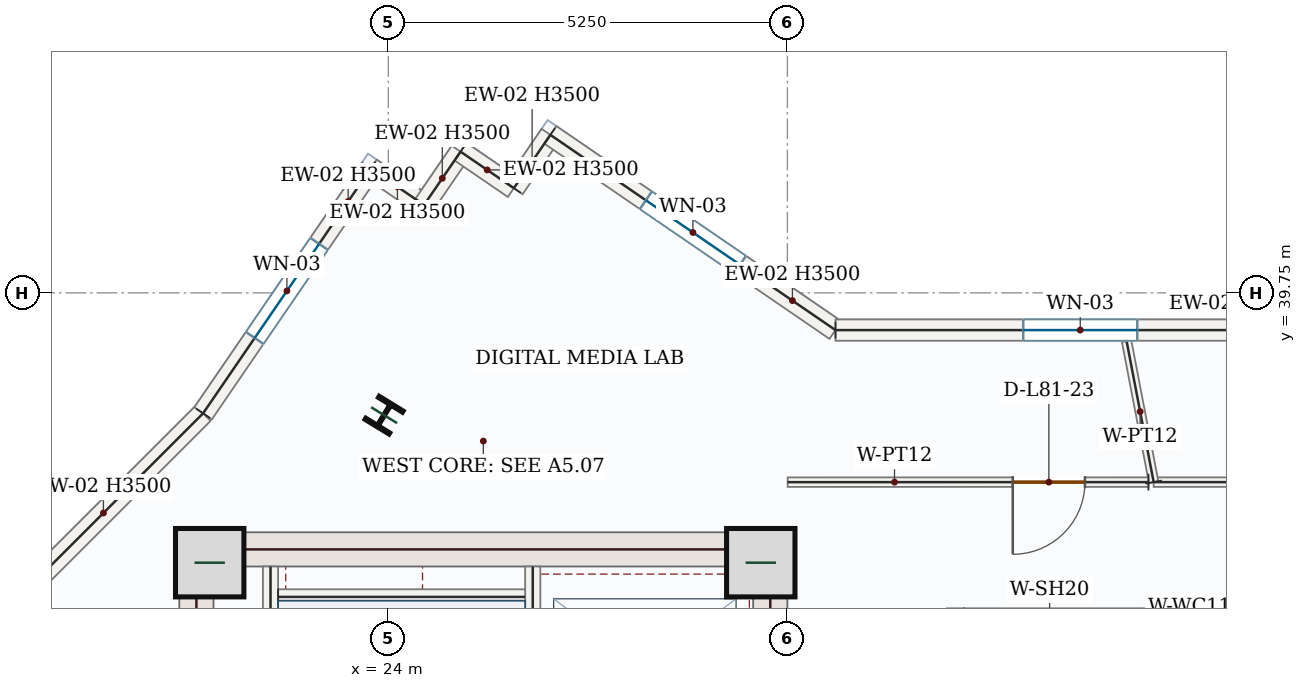
"""IFC4 building model, lengths in metres.
Left out: names, types, materials, properties, quantities, classifications, styles, units other than length and angle.
Written with IfcOpenShell. Run it as: python <this file> out.ifc"""

import sys

from ifc_helpers import new_model, si_unit, direction, frame, frame_2d, origin, origin_2d, place, context, subcontext, project, spatial, rectangle, i_section, extrude, source, transform, mapped, element, fill, save


model = new_model("IFC4")
c1 = context("Model", 3, precision=1e-05, world=origin(), true_north=direction((0.0, 1.0)))
c2 = subcontext(c1, "Body", "Model", "MODEL_VIEW")
j1 = project(units=[si_unit("LENGTHUNIT", "METRE"), si_unit("PLANEANGLEUNIT", "RADIAN")], contexts=[c1])
p1 = place(None, origin())
s1 = spatial("IfcSite", under=j1, at=p1, CompositionType="ELEMENT")
p2 = place(p1, origin())
s2 = spatial("IfcBuilding", under=s1, at=p2, CompositionType="ELEMENT")
p3 = place(p2, frame((0.0, 0.0, 334.8)))
s3 = spatial("IfcBuildingStorey", under=s2, at=p3, CompositionType="ELEMENT", Elevation=334.8)
m1 = source(origin(), c2, "Body", "SweptSolid", [
    extrude(rectangle(XDim=8.55, YDim=0.45, at=frame_2d((4.275, 0.0))), origin(), (0.0, 0.0, 1.0), 3.5),
])
p4 = place(p3, frame((21.475, 28.05, 0.0), z_axis=(0.0, 0.0, 1.0), x_axis=(0.0, 1.0, 0.0)))
e1 = element("IfcWall", 1, at=p4, inside=s3, PredefinedType="SHEAR", context=c2, shape_type="MappedRepresentation", body=[
    mapped(m1, transform((0.0, 0.0, 0.0), x_axis=(1.0, 0.0, 0.0), y_axis=(0.0, 1.0, 0.0), z_axis=(0.0, 0.0, 1.0), scale=1.0)),
])
p5 = place(p3, frame((29.025, 28.05, 0.0), z_axis=(0.0, 0.0, 1.0), x_axis=(0.0, 1.0, 0.0)))
e2 = element("IfcWall", 2, at=p5, inside=s3, PredefinedType="SHEAR", context=c2, shape_type="SweptSolid", body=[
    extrude(rectangle(XDim=8.55, YDim=0.45, at=frame_2d((4.275, 0.0))), origin(), (0.0, 0.0, 1.0), 3.5),
])
p6 = place(p5, frame((1.5, 0.0, 0.0)))
e3 = element("IfcOpeningElement", 3, at=p6, cuts=e2, PredefinedType="OPENING", context=c2, shape_type="SweptSolid", body=[
    extrude(rectangle(XDim=1.1, YDim=2.2, at=frame_2d((0.55, 1.1))), frame((0.0, 0.235, 0.0), z_axis=(0.0, -1.0, 0.0), x_axis=(1.0, 0.0, 0.0)), (0.0, 0.0, 1.0), 0.47),
])
m2 = source(origin(), c2, "Body", "SweptSolid", [
    extrude(rectangle(XDim=7.1, YDim=0.45, at=frame_2d((3.55, 0.0))), origin(), (0.0, 0.0, 1.0), 3.5),
])
p7 = place(p3, frame((21.7, 36.375, 0.0), z_axis=(0.0, 0.0, 1.0), x_axis=(1.0, 0.0, 0.0)))
e4 = element("IfcWall", 4, at=p7, inside=s3, PredefinedType="SHEAR", context=c2, shape_type="MappedRepresentation", body=[
    mapped(m2, transform((0.0, 0.0, 0.0), x_axis=(1.0, 0.0, 0.0), y_axis=(0.0, 1.0, 0.0), z_axis=(0.0, 0.0, 1.0), scale=1.0)),
])
m3 = source(origin(), c2, "Body", "SweptSolid", [
    extrude(rectangle(XDim=0.9, YDim=0.9, at=origin_2d()), origin(), (0.0, 0.0, 1.0), 3.75),
])
for number, where, z_axis, x_axis in (
    (5, (21.65, 36.2, 0.0), (0.0, 0.0, 1.0), (1.0, 0.0, 0.0)),
    (6, (28.9, 36.2, 0.0), (0.0, 0.0, 1.0), (1.0, 0.0, 0.0)),
):
    element("IfcColumn", number, at=place(p3, frame(where, z_axis=z_axis, x_axis=x_axis)), inside=s3, PredefinedType="COLUMN", context=c2, shape_type="MappedRepresentation", body=[
        mapped(m3, transform((0.0, 0.0, 0.0), x_axis=(1.0, 0.0, 0.0), y_axis=(0.0, 1.0, 0.0), z_axis=(0.0, 0.0, 1.0), scale=1.0)),
    ])
m4 = source(origin(), c2, "Body", "SweptSolid", [
    extrude(i_section(OverallWidth=0.369, OverallDepth=0.356, WebThickness=0.011, FlangeThickness=0.018, FilletRadius=0.018, at=origin_2d()), origin(), (0.0, 0.0, 1.0), 3.75),
])
p8 = place(p3, frame((23.945, 38.141, 0.0), z_axis=(0.0, 0.0, 1.0), x_axis=(-0.852640164354, 0.522498564716, 0.0)))
e7 = element("IfcColumn", 7, at=p8, inside=s3, PredefinedType="COLUMN", context=c2, shape_type="MappedRepresentation", body=[
    mapped(m4, transform((0.0, 0.0, 0.0), x_axis=(1.0, 0.0, 0.0), y_axis=(0.0, 1.0, 0.0), z_axis=(0.0, 0.0, 1.0), scale=1.0)),
])
m5 = source(origin(), c2, "Body", "SweptSolid", [
    extrude(rectangle(XDim=3.709, YDim=0.28, at=frame_2d((1.855, 0.0))), origin(), (0.0, 0.0, 1.0), 3.5),
])
p9 = place(p3, frame((18.94, 35.542, 0.0), z_axis=(0.0, 0.0, 1.0), x_axis=(0.707106781187, 0.707106781187, 0.0)))
e8 = element("IfcWall", 8, at=p9, inside=s3, PredefinedType="SOLIDWALL", context=c2, shape_type="MappedRepresentation", body=[
    mapped(m5, transform((0.0, 0.0, 0.0), x_axis=(1.0, 0.0, 0.0), y_axis=(0.0, 1.0, 0.0), z_axis=(0.0, 0.0, 1.0), scale=1.0)),
])
p10 = place(p3, frame((21.563, 38.165, 0.0), z_axis=(0.0, 0.0, 1.0), x_axis=(0.564961879511, 0.825117006672, 0.0)))
e9 = element("IfcWall", 9, at=p10, inside=s3, PredefinedType="SOLIDWALL", context=c2, shape_type="SweptSolid", body=[
    extrude(rectangle(XDim=3.904, YDim=0.28, at=frame_2d((1.952, 0.0))), origin(), (0.0, 0.0, 1.0), 3.5),
])
p11 = place(p10, frame((1.202, 0.0, 0.85)))
e10 = element("IfcOpeningElement", 10, at=p11, cuts=e9, PredefinedType="OPENING", context=c2, shape_type="SweptSolid", body=[
    extrude(rectangle(XDim=1.5, YDim=1.5, at=frame_2d((0.75, 0.75))), frame((0.0, 0.15, 0.0), z_axis=(0.0, -1.0, 0.0), x_axis=(1.0, 0.0, 0.0)), (0.0, 0.0, 1.0), 0.3),
])
m6 = source(origin(), c2, "Body", "SweptSolid", [
    extrude(rectangle(XDim=0.85, YDim=0.28, at=frame_2d((0.425, 0.0))), origin(), (0.0, 0.0, 1.0), 3.5),
])
for number, where, z_axis, x_axis in (
    (11, (23.769, 41.386, 0.0), (0.0, 0.0, 1.0), (0.825, -0.565, 0.0)),
    (12, (24.47, 40.906, 0.0), (0.0, 0.0, 1.0), (0.565, 0.825, 0.0)),
    (13, (24.95, 41.607, 0.0), (0.0, 0.0, 1.0), (0.825, -0.565, 0.0)),
    (14, (25.652, 41.127, 0.0), (0.0, 0.0, 1.0), (0.565, 0.825, 0.0)),
):
    element("IfcWall", number, at=place(p3, frame(where, z_axis=z_axis, x_axis=x_axis)), inside=s3, PredefinedType="SOLIDWALL", context=c2, shape_type="MappedRepresentation", body=[
        mapped(m6, transform((0.0, 0.0, 0.0), x_axis=(1.0, 0.0, 0.0), y_axis=(0.0, 1.0, 0.0), z_axis=(0.0, 0.0, 1.0), scale=1.0)),
    ])
p12 = place(p3, frame((26.132, 41.829, 0.0), z_axis=(0.0, 0.0, 1.0), x_axis=(0.825104362901, -0.564980345075, 0.0)))
e15 = element("IfcWall", 15, at=p12, inside=s3, PredefinedType="SOLIDWALL", context=c2, shape_type="SweptSolid", body=[
    extrude(rectangle(XDim=4.546, YDim=0.28, at=frame_2d((2.273, 0.0))), origin(), (0.0, 0.0, 1.0), 3.5),
])
p13 = place(p12, frame((1.523, 0.0, 0.85)))
e16 = element("IfcOpeningElement", 16, at=p13, cuts=e15, PredefinedType="OPENING", context=c2, shape_type="SweptSolid", body=[
    extrude(rectangle(XDim=1.5, YDim=1.5, at=frame_2d((0.75, 0.75))), frame((0.0, 0.15, 0.0), z_axis=(0.0, -1.0, 0.0), x_axis=(1.0, 0.0, 0.0)), (0.0, 0.0, 1.0), 0.3),
])
p14 = place(p3, frame((29.883, 39.26, 0.0), z_axis=(0.0, 0.0, 1.0), x_axis=(1.0, 0.0, 0.0)))
e17 = element("IfcWall", 17, at=p14, inside=s3, PredefinedType="SOLIDWALL", context=c2, shape_type="SweptSolid", body=[
    extrude(rectangle(XDim=6.44, YDim=0.28, at=frame_2d((3.22, 0.0))), origin(), (0.0, 0.0, 1.0), 3.5),
])
p15 = place(p14, frame((2.47, 0.0, 0.85)))
e18 = element("IfcOpeningElement", 18, at=p15, cuts=e17, PredefinedType="OPENING", context=c2, shape_type="SweptSolid", body=[
    extrude(rectangle(XDim=1.5, YDim=1.5, at=frame_2d((0.75, 0.75))), frame((0.0, 0.15, 0.0), z_axis=(0.0, -1.0, 0.0), x_axis=(1.0, 0.0, 0.0)), (0.0, 0.0, 1.0), 0.3),
])
m7 = source(origin(), c2, "Body", "SweptSolid", [
    extrude(rectangle(XDim=7.87, YDim=0.2, at=frame_2d((3.935, 0.0))), origin(), (0.0, 0.0, 1.0), 3.5),
])
p16 = place(p3, frame((22.45, 28.28, 0.0), z_axis=(0.0, 0.0, 1.0), x_axis=(0.0, 1.0, 0.0)))
e19 = element("IfcWall", 19, at=p16, inside=s3, PredefinedType="SOLIDWALL", context=c2, shape_type="MappedRepresentation", body=[
    mapped(m7, transform((0.0, 0.0, 0.0), x_axis=(1.0, 0.0, 0.0), y_axis=(0.0, 1.0, 0.0), z_axis=(0.0, 0.0, 1.0), scale=1.0)),
])
p17 = place(p3, frame((25.9, 28.15, 0.0), z_axis=(0.0, 0.0, 1.0), x_axis=(0.0, 1.0, 0.0)))
e20 = element("IfcWall", 20, at=p17, inside=s3, PredefinedType="SOLIDWALL", context=c2, shape_type="SweptSolid", body=[
    extrude(rectangle(XDim=8.0, YDim=0.2, at=frame_2d((4.0, 0.0))), origin(), (0.0, 0.0, 1.0), 3.5),
])
p18 = place(p17, frame((0.4, 0.0, 0.0)))
e21 = element("IfcOpeningElement", 21, at=p18, cuts=e20, PredefinedType="OPENING", context=c2, shape_type="SweptSolid", body=[
    extrude(rectangle(XDim=1.05, YDim=2.15, at=frame_2d((0.525, 1.075))), frame((0.0, 0.11, 0.0), z_axis=(0.0, -1.0, 0.0), x_axis=(1.0, 0.0, 0.0)), (0.0, 0.0, 1.0), 0.22),
])
m8 = source(origin(), c2, "Body", "SweptSolid", [
    extrude(rectangle(XDim=3.25, YDim=0.2, at=frame_2d((1.625, 0.0))), origin(), (0.0, 0.0, 1.0), 3.5),
])
p19 = place(p3, frame((22.55, 35.75, 0.0), z_axis=(0.0, 0.0, 1.0), x_axis=(1.0, 0.0, 0.0)))
e22 = element("IfcWall", 22, at=p19, inside=s3, PredefinedType="SOLIDWALL", context=c2, shape_type="MappedRepresentation", body=[
    mapped(m8, transform((0.0, 0.0, 0.0), x_axis=(1.0, 0.0, 0.0), y_axis=(0.0, 1.0, 0.0), z_axis=(0.0, 0.0, 1.0), scale=1.0)),
])
p20 = place(p3, frame((31.45, 33.2, 0.0), z_axis=(0.0, 0.0, 1.0), x_axis=(0.0, 1.0, 0.0)))
e23 = element("IfcWall", 23, at=p20, inside=s3, PredefinedType="SOLIDWALL", context=c2, shape_type="SweptSolid", body=[
    extrude(rectangle(XDim=2.4, YDim=0.2, at=frame_2d((1.2, 0.0))), origin(), (0.0, 0.0, 1.0), 3.5),
])
p21 = place(p20, frame((0.65, 0.0, 0.0)))
e24 = element("IfcOpeningElement", 24, at=p21, cuts=e23, PredefinedType="OPENING", context=c2, shape_type="SweptSolid", body=[
    extrude(rectangle(XDim=1.1, YDim=2.15, at=frame_2d((0.55, 1.075))), frame((0.0, 0.11, 0.0), z_axis=(0.0, -1.0, 0.0), x_axis=(1.0, 0.0, 0.0)), (0.0, 0.0, 1.0), 0.22),
])
m9 = source(origin(), c2, "Body", "SweptSolid", [
    extrude(rectangle(XDim=2.4, YDim=0.2, at=frame_2d((1.2, 0.0))), origin(), (0.0, 0.0, 1.0), 3.5),
])
p22 = place(p3, frame((33.95, 33.2, 0.0), z_axis=(0.0, 0.0, 1.0), x_axis=(0.0, 1.0, 0.0)))
e25 = element("IfcWall", 25, at=p22, inside=s3, PredefinedType="SOLIDWALL", context=c2, shape_type="MappedRepresentation", body=[
    mapped(m9, transform((0.0, 0.0, 0.0), x_axis=(1.0, 0.0, 0.0), y_axis=(0.0, 1.0, 0.0), z_axis=(0.0, 0.0, 1.0), scale=1.0)),
])
p23 = place(p3, frame((39.765, 37.26, 0.0), z_axis=(0.0, 0.0, 1.0), x_axis=(-1.0, 0.0, 0.0)))
e26 = element("IfcWall", 26, at=p23, inside=s3, PredefinedType="PARTITIONING", context=c2, shape_type="SweptSolid", body=[
    extrude(rectangle(XDim=5.696, YDim=0.125, at=frame_2d((2.848, 0.0))), origin(), (0.0, 0.0, 1.0), 3.5),
])
p24 = place(p23, frame((3.085, 0.0, 0.0)))
e27 = element("IfcOpeningElement", 27, at=p24, cuts=e26, PredefinedType="OPENING", context=c2, shape_type="SweptSolid", body=[
    extrude(rectangle(XDim=0.95, YDim=2.15, at=frame_2d((0.475, 1.075))), frame((0.0, 0.073, 0.0), z_axis=(0.0, -1.0, 0.0), x_axis=(1.0, 0.0, 0.0)), (0.0, 0.0, 1.0), 0.145),
])
m10 = source(origin(), c2, "Body", "SweptSolid", [
    extrude(rectangle(XDim=1.889, YDim=0.125, at=frame_2d((0.944, 0.0))), origin(), (0.0, 0.0, 1.0), 3.5),
])
p25 = place(p3, frame((34.069, 37.26, 0.0), z_axis=(0.0, 0.0, 1.0), x_axis=(-0.188454265316, 0.982081966989, 0.0)))
e28 = element("IfcWall", 28, at=p25, inside=s3, PredefinedType="PARTITIONING", context=c2, shape_type="MappedRepresentation", body=[
    mapped(m10, transform((0.0, 0.0, 0.0), x_axis=(1.0, 0.0, 0.0), y_axis=(0.0, 1.0, 0.0), z_axis=(0.0, 0.0, 1.0), scale=1.0)),
])
p26 = place(p3, frame((34.0, 37.26, 0.0), z_axis=(0.0, 0.0, 1.0), x_axis=(-0.999999994709, -0.000102870075, 0.0)))
e29 = element("IfcWall", 29, at=p26, inside=s3, PredefinedType="PARTITIONING", context=c2, shape_type="SweptSolid", body=[
    extrude(rectangle(XDim=4.747, YDim=0.125, at=frame_2d((2.373, 0.0))), origin(), (0.0, 0.0, 1.0), 3.5),
])
p27 = place(p26, frame((0.835, 0.0, 0.0)))
e30 = element("IfcOpeningElement", 30, at=p27, cuts=e29, PredefinedType="OPENING", context=c2, shape_type="SweptSolid", body=[
    extrude(rectangle(XDim=0.95, YDim=2.15, at=frame_2d((0.475, 1.075))), frame((0.0, 0.073, 0.0), z_axis=(0.0, -1.0, 0.0), x_axis=(1.0, 0.0, 0.0)), (0.0, 0.0, 1.0), 0.145),
])
m11 = source(origin(), c2, "Body", "SweptSolid", [
    extrude(rectangle(XDim=1.5, YDim=1.5, at=frame_2d((0.75, 0.75))), frame((0.0, 0.03, 0.0), z_axis=(0.0, -1.0, 0.0), x_axis=(1.0, 0.0, 0.0)), (0.0, 0.0, 1.0), 0.06),
])
p28 = place(p11, origin())
e31 = element("IfcWindow", 31, at=p28, inside=s3, PartitioningType="SINGLE_PANEL", PredefinedType="WINDOW", context=c2, shape_type="MappedRepresentation", body=[
    mapped(m11, transform((0.0, 0.0, 0.0), x_axis=(1.0, 0.0, 0.0), y_axis=(0.0, 1.0, 0.0), z_axis=(0.0, 0.0, 1.0), scale=1.0)),
])
fill(e10, e31)
p29 = place(p13, origin())
e32 = element("IfcWindow", 32, at=p29, inside=s3, PartitioningType="SINGLE_PANEL", PredefinedType="WINDOW", context=c2, shape_type="MappedRepresentation", body=[
    mapped(m11, transform((0.0, 0.0, 0.0), x_axis=(1.0, 0.0, 0.0), y_axis=(0.0, 1.0, 0.0), z_axis=(0.0, 0.0, 1.0), scale=1.0)),
])
fill(e16, e32)
p30 = place(p15, origin())
e33 = element("IfcWindow", 33, at=p30, inside=s3, PartitioningType="SINGLE_PANEL", PredefinedType="WINDOW", context=c2, shape_type="MappedRepresentation", body=[
    mapped(m11, transform((0.0, 0.0, 0.0), x_axis=(1.0, 0.0, 0.0), y_axis=(0.0, 1.0, 0.0), z_axis=(0.0, 0.0, 1.0), scale=1.0)),
])
fill(e18, e33)
m12 = source(origin(), c2, "Body", "SweptSolid", [
    extrude(rectangle(XDim=0.95, YDim=2.15, at=frame_2d((0.475, 1.075))), frame((0.0, 0.025, 0.0), z_axis=(0.0, -1.0, 0.0), x_axis=(1.0, 0.0, 0.0)), (0.0, 0.0, 1.0), 0.05),
])
p31 = place(p27, origin())
e34 = element("IfcDoor", 34, at=p31, inside=s3, OperationType="SINGLE_SWING_RIGHT", PredefinedType="DOOR", context=c2, shape_type="MappedRepresentation", body=[
    mapped(m12, transform((0.0, 0.0, 0.0), x_axis=(1.0, 0.0, 0.0), y_axis=(0.0, 1.0, 0.0), z_axis=(0.0, 0.0, 1.0), scale=1.0)),
])
fill(e30, e34)
save(model, sys.argv[1])
